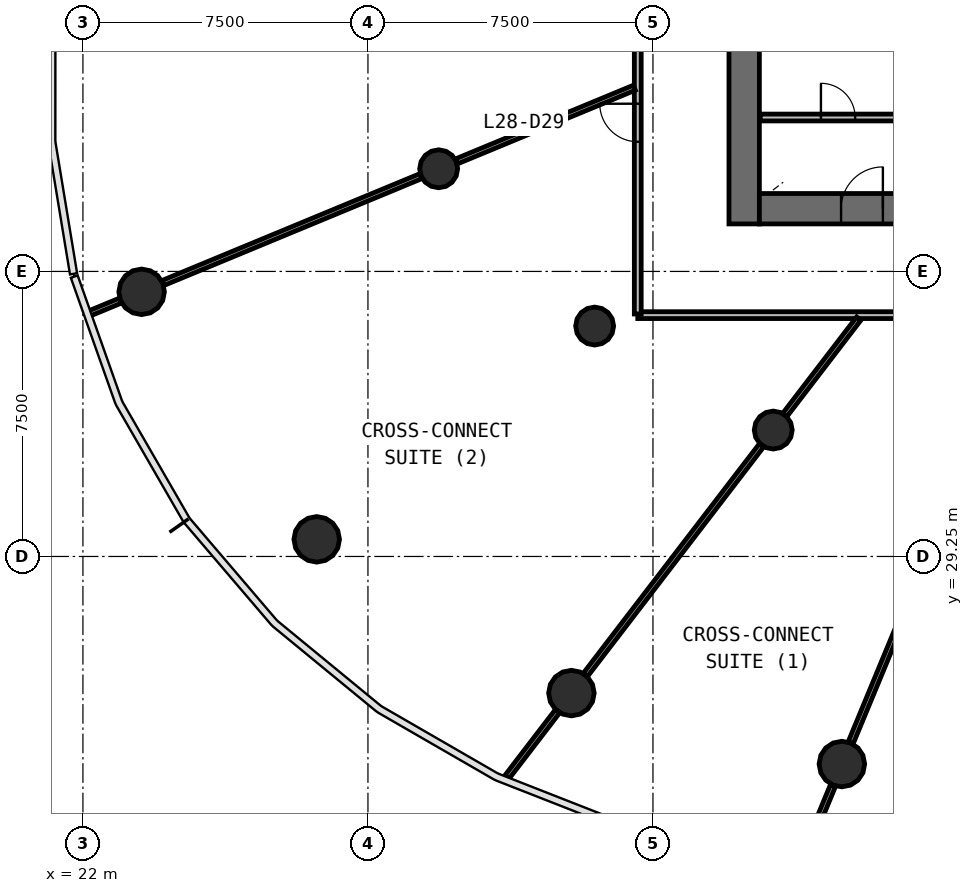
"""IFC4 building model, lengths in metres.
Left out: names, types, materials, properties, quantities, classifications, styles, units other than length and angle.
Written with IfcOpenShell. Run it as: python <this file> out.ifc"""

import sys

from ifc_helpers import new_model, si_unit, direction, frame, frame_2d, origin, origin_2d, place, context, subcontext, project, spatial, rectangle, circle, extrude, source, transform, mapped, element, fill, save


model = new_model("IFC4")
c1 = context("Model", 3, precision=1e-05, world=origin(), true_north=direction((0.0, 1.0)))
c2 = subcontext(c1, "Body", "Model", "MODEL_VIEW")
j1 = project(units=[si_unit("LENGTHUNIT", "METRE"), si_unit("PLANEANGLEUNIT", "RADIAN")], contexts=[c1])
p1 = place(None, origin())
s1 = spatial("IfcSite", under=j1, at=p1, CompositionType="ELEMENT")
p2 = place(p1, origin())
s2 = spatial("IfcBuilding", under=s1, at=p2, CompositionType="ELEMENT")
p3 = place(p2, frame((0.0, 0.0, 120.8)))
s3 = spatial("IfcBuildingStorey", under=s2, at=p3, CompositionType="ELEMENT", Elevation=120.8)
p4 = place(p3, frame((39.4, 58.0, 0.0), z_axis=(0.0, 0.0, 1.0), x_axis=(0.0, -1.0, 0.0)))
e1 = element("IfcWall", 1, at=p4, inside=s3, PredefinedType="SHEAR", context=c2, shape_type="SweptSolid", body=[
    extrude(rectangle(XDim=20.0, YDim=0.8, at=frame_2d((10.0, 0.0))), origin(), (0.0, 0.0, 1.0), 4.1),
])
p5 = place(p4, frame((9.1, 0.0, 0.0)))
e2 = element("IfcOpeningElement", 2, at=p5, cuts=e1, PredefinedType="OPENING", context=c2, shape_type="SweptSolid", body=[
    extrude(rectangle(XDim=1.8, YDim=2.1, at=frame_2d((0.9, 1.05))), frame((0.0, 0.41, 0.0), z_axis=(0.0, -1.0, 0.0), x_axis=(1.0, 0.0, 0.0)), (0.0, 0.0, 1.0), 0.82),
])
p6 = place(p3, frame((39.8, 38.4, 0.0), z_axis=(0.0, 0.0, 1.0), x_axis=(1.0, 0.0, 0.0)))
e3 = element("IfcWall", 3, at=p6, inside=s3, PredefinedType="SHEAR", context=c2, shape_type="SweptSolid", body=[
    extrude(rectangle(XDim=24.4, YDim=0.8, at=frame_2d((12.2, 0.0))), origin(), (0.0, 0.0, 1.0), 4.1),
])
p7 = place(p6, frame((21.65, 0.0, 0.0)))
e4 = element("IfcOpeningElement", 4, at=p7, cuts=e3, PredefinedType="OPENING", context=c2, shape_type="SweptSolid", body=[
    extrude(rectangle(XDim=1.1, YDim=2.1, at=frame_2d((0.55, 1.05))), frame((0.0, 0.41, 0.0), z_axis=(0.0, -1.0, 0.0), x_axis=(1.0, 0.0, 0.0)), (0.0, 0.0, 1.0), 0.82),
])
p8 = place(p6, frame((2.15, 0.0, 0.0)))
e5 = element("IfcOpeningElement", 5, at=p8, cuts=e3, PredefinedType="OPENING", context=c2, shape_type="SweptSolid", body=[
    extrude(rectangle(XDim=1.1, YDim=2.1, at=frame_2d((0.55, 1.05))), frame((0.0, 0.41, 0.0), z_axis=(0.0, -1.0, 0.0), x_axis=(1.0, 0.0, 0.0)), (0.0, 0.0, 1.0), 0.82),
])
m1 = source(origin(), c2, "Body", "SweptSolid", [
    extrude(circle(Radius=0.6, at=origin_2d()), origin(), (0.0, 0.0, 1.0), 4.1),
])
for number, where, z_axis, x_axis in (
    (6, (23.544, 36.213, 0.0), (0.0, 0.0, 1.0), (1.0, 0.0, 0.0)),
    (7, (28.152, 29.701, 0.0), (0.0, 0.0, 1.0), (1.0, 0.0, 0.0)),
    (8, (34.854, 25.655, 0.0), (0.0, 0.0, 1.0), (1.0, 0.0, 0.0)),
    (9, (41.971, 23.788, 0.0), (0.0, 0.0, 1.0), (1.0, 0.0, 0.0)),
):
    element("IfcColumn", number, at=place(p3, frame(where, z_axis=z_axis, x_axis=x_axis)), inside=s3, PredefinedType="COLUMN", context=c2, shape_type="MappedRepresentation", body=[
        mapped(m1, transform((0.0, 0.0, 0.0), scale=1.0)),
    ])
m2 = source(origin(), c2, "Body", "SweptSolid", [
    extrude(circle(Radius=0.5, at=origin_2d()), origin(), (0.0, 0.0, 1.0), 4.1),
])
for number, where, z_axis, x_axis in (
    (10, (31.361, 39.451, 0.0), (0.0, 0.0, 1.0), (1.0, 0.0, 0.0)),
    (11, (35.465, 35.312, 0.0), (0.0, 0.0, 1.0), (1.0, 0.0, 0.0)),
    (12, (40.165, 32.576, 0.0), (0.0, 0.0, 1.0), (1.0, 0.0, 0.0)),
):
    element("IfcColumn", number, at=place(p3, frame(where, z_axis=z_axis, x_axis=x_axis)), inside=s3, PredefinedType="COLUMN", context=c2, shape_type="MappedRepresentation", body=[
        mapped(m2, transform((0.0, 0.0, 0.0), scale=1.0)),
    ])
p9 = place(p3, frame((67.4, 35.6, 0.0), z_axis=(0.0, 0.0, 1.0), x_axis=(-1.0, 0.0, 0.0)))
e13 = element("IfcWall", 13, at=p9, inside=s3, PredefinedType="PARTITIONING", context=c2, shape_type="SweptSolid", body=[
    extrude(rectangle(XDim=30.8, YDim=0.18, at=frame_2d((15.4, 0.0))), origin(), (0.0, 0.0, 1.0), 2.9),
])
p10 = place(p9, frame((20.95, 0.0, 0.0)))
e14 = element("IfcOpeningElement", 14, at=p10, cuts=e13, PredefinedType="OPENING", context=c2, shape_type="SweptSolid", body=[
    extrude(rectangle(XDim=1.0, YDim=2.1, at=frame_2d((0.5, 1.05))), frame((0.0, 0.1, 0.0), z_axis=(0.0, -1.0, 0.0), x_axis=(1.0, 0.0, 0.0)), (0.0, 0.0, 1.0), 0.2),
])
p11 = place(p9, frame((14.95, 0.0, 0.0)))
e15 = element("IfcOpeningElement", 15, at=p11, cuts=e13, PredefinedType="OPENING", context=c2, shape_type="SweptSolid", body=[
    extrude(rectangle(XDim=1.0, YDim=2.1, at=frame_2d((0.5, 1.05))), frame((0.0, 0.1, 0.0), z_axis=(0.0, -1.0, 0.0), x_axis=(1.0, 0.0, 0.0)), (0.0, 0.0, 1.0), 0.2),
])
p12 = place(p9, frame((12.55, 0.0, 0.0)))
e16 = element("IfcOpeningElement", 16, at=p12, cuts=e13, PredefinedType="OPENING", context=c2, shape_type="SweptSolid", body=[
    extrude(rectangle(XDim=1.0, YDim=2.1, at=frame_2d((0.5, 1.05))), frame((0.0, 0.1, 0.0), z_axis=(0.0, -1.0, 0.0), x_axis=(1.0, 0.0, 0.0)), (0.0, 0.0, 1.0), 0.2),
])
p13 = place(p3, frame((36.6, 35.63, 0.0), z_axis=(0.0, 0.0, 1.0), x_axis=(0.0, 1.0, 0.0)))
e17 = element("IfcWall", 17, at=p13, inside=s3, PredefinedType="PARTITIONING", context=c2, shape_type="SweptSolid", body=[
    extrude(rectangle(XDim=23.583, YDim=0.18, at=frame_2d((11.791, 0.0))), origin(), (0.0, 0.0, 1.0), 2.9),
])
p14 = place(p13, frame((11.333, 0.0, 0.0)))
e18 = element("IfcOpeningElement", 18, at=p14, cuts=e17, PredefinedType="OPENING", context=c2, shape_type="SweptSolid", body=[
    extrude(rectangle(XDim=1.0, YDim=2.1, at=frame_2d((0.5, 1.05))), frame((0.0, 0.1, 0.0), z_axis=(0.0, -1.0, 0.0), x_axis=(1.0, 0.0, 0.0)), (0.0, 0.0, 1.0), 0.2),
])
p15 = place(p13, frame((4.532, 0.0, 0.0)))
e19 = element("IfcOpeningElement", 19, at=p15, cuts=e17, PredefinedType="OPENING", context=c2, shape_type="SweptSolid", body=[
    extrude(rectangle(XDim=1.0, YDim=2.1, at=frame_2d((0.5, 1.05))), frame((0.0, 0.1, 0.0), z_axis=(0.0, -1.0, 0.0), x_axis=(1.0, 0.0, 0.0)), (0.0, 0.0, 1.0), 0.2),
])
p16 = place(p3, frame((39.82, 40.8, 0.0), z_axis=(0.0, 0.0, 1.0), x_axis=(1.0, 0.0, 0.0)))
e20 = element("IfcWall", 20, at=p16, inside=s3, PredefinedType="PARTITIONING", context=c2, shape_type="SweptSolid", body=[
    extrude(rectangle(XDim=3.95, YDim=0.18, at=frame_2d((1.975, 0.0))), origin(), (0.0, 0.0, 1.0), 3.7),
])
p17 = place(p16, frame((1.6, 0.0, 0.0)))
e21 = element("IfcOpeningElement", 21, at=p17, cuts=e20, PredefinedType="OPENING", context=c2, shape_type="SweptSolid", body=[
    extrude(rectangle(XDim=0.9, YDim=2.1, at=frame_2d((0.45, 1.05))), frame((0.0, 0.1, 0.0), z_axis=(0.0, -1.0, 0.0), x_axis=(1.0, 0.0, 0.0)), (0.0, 0.0, 1.0), 0.2),
])
p18 = place(p3, frame((39.858, 32.176, 0.0), z_axis=(0.0, 0.0, 1.0), x_axis=(-0.608755907151, -0.793357577331, 0.0)))
e22 = element("IfcWall", 22, at=p18, inside=s3, PredefinedType="PARTITIONING", context=c2, shape_type="SweptSolid", body=[
    extrude(rectangle(XDim=7.615, YDim=0.14, at=frame_2d((3.808, 0.0))), origin(), (0.0, 0.0, 1.0), 2.9),
])
p19 = place(p3, frame((30.894, 39.258, 0.0), z_axis=(0.0, 0.0, 1.0), x_axis=(-0.923867037115, -0.382713597528, 0.0)))
e23 = element("IfcWall", 23, at=p19, inside=s3, PredefinedType="PARTITIONING", context=c2, shape_type="SweptSolid", body=[
    extrude(rectangle(XDim=7.35, YDim=0.14, at=frame_2d((3.675, 0.0))), origin(), (0.0, 0.0, 1.0), 2.9),
])
p20 = place(p3, frame((44.752, 30.502, 0.0), z_axis=(0.0, 0.0, 1.0), x_axis=(-0.382696989205, -0.923873916968, 0.0)))
e24 = element("IfcWall", 24, at=p20, inside=s3, PredefinedType="PARTITIONING", context=c2, shape_type="SweptSolid", body=[
    extrude(rectangle(XDim=6.663, YDim=0.14, at=frame_2d((3.332, 0.0))), origin(), (0.0, 0.0, 1.0), 2.9),
])
p21 = place(p3, frame((36.51, 41.584, 0.0), z_axis=(0.0, 0.0, 1.0), x_axis=(-0.923890025086, -0.382658100067, 0.0)))
e25 = element("IfcWall", 25, at=p21, inside=s3, PredefinedType="PARTITIONING", context=c2, shape_type="SweptSolid", body=[
    extrude(rectangle(XDim=5.068, YDim=0.14, at=frame_2d((2.534, 0.0))), origin(), (0.0, 0.0, 1.0), 2.9),
])
p22 = place(p3, frame((42.416, 35.51, 0.0), z_axis=(0.0, 0.0, 1.0), x_axis=(-0.60874605662, -0.793365135703, 0.0)))
e26 = element("IfcWall", 26, at=p22, inside=s3, PredefinedType="PARTITIONING", context=c2, shape_type="SweptSolid", body=[
    extrude(rectangle(XDim=3.194, YDim=0.14, at=frame_2d((1.597, 0.0))), origin(), (0.0, 0.0, 1.0), 2.9),
])
p23 = place(p3, frame((34.486, 25.176, 0.0), z_axis=(0.0, 0.0, 1.0), x_axis=(-0.608790940556, -0.793330694412, 0.0)))
e27 = element("IfcWall", 27, at=p23, inside=s3, PredefinedType="PARTITIONING", context=c2, shape_type="SweptSolid", body=[
    extrude(rectangle(XDim=2.182, YDim=0.14, at=frame_2d((1.091, 0.0))), origin(), (0.0, 0.0, 1.0), 2.9),
])
p24 = place(p3, frame((41.74, 23.229, 0.0), z_axis=(0.0, 0.0, 1.0), x_axis=(-0.38271416586, -0.923866801682, 0.0)))
e28 = element("IfcWall", 28, at=p24, inside=s3, PredefinedType="PARTITIONING", context=c2, shape_type="SweptSolid", body=[
    extrude(rectangle(XDim=2.162, YDim=0.14, at=frame_2d((1.081, 0.0))), origin(), (0.0, 0.0, 1.0), 2.9),
])
p25 = place(p3, frame((22.986, 35.982, 0.0), z_axis=(0.0, 0.0, 1.0), x_axis=(-0.923950055321, -0.38251313085, 0.0)))
e29 = element("IfcWall", 29, at=p25, inside=s3, PredefinedType="PARTITIONING", context=c2, shape_type="SweptSolid", body=[
    extrude(rectangle(XDim=0.891, YDim=0.14, at=frame_2d((0.446, 0.0))), origin(), (0.0, 0.0, 1.0), 2.9),
])
m3 = source(origin(), c2, "Body", "SweptSolid", [
    extrude(rectangle(XDim=1.1, YDim=2.1, at=frame_2d((0.55, 1.05))), frame((0.0, 0.025, 0.0), z_axis=(0.0, -1.0, 0.0), x_axis=(1.0, 0.0, 0.0)), (0.0, 0.0, 1.0), 0.05),
])
p26 = place(p8, origin())
e30 = element("IfcDoor", 30, at=p26, inside=s3, OperationType="SINGLE_SWING_RIGHT", PredefinedType="DOOR", context=c2, shape_type="MappedRepresentation", body=[
    mapped(m3, transform((0.0, 0.0, 0.0), scale=1.0)),
])
fill(e5, e30)
m4 = source(origin(), c2, "Body", "SweptSolid", [
    extrude(rectangle(XDim=1.0, YDim=2.1, at=frame_2d((0.5, 1.05))), frame((0.0, 0.025, 0.0), z_axis=(0.0, -1.0, 0.0), x_axis=(1.0, 0.0, 0.0)), (0.0, 0.0, 1.0), 0.05),
])
p27 = place(p15, origin())
e31 = element("IfcDoor", 31, at=p27, inside=s3, OperationType="SINGLE_SWING_RIGHT", PredefinedType="DOOR", context=c2, shape_type="MappedRepresentation", body=[
    mapped(m4, transform((0.0, 0.0, 0.0), scale=1.0)),
])
fill(e19, e31)
m5 = source(origin(), c2, "Body", "SweptSolid", [
    extrude(rectangle(XDim=0.9, YDim=2.1, at=frame_2d((0.45, 1.05))), frame((0.0, 0.025, 0.0), z_axis=(0.0, -1.0, 0.0), x_axis=(1.0, 0.0, 0.0)), (0.0, 0.0, 1.0), 0.05),
])
p28 = place(p17, origin())
e32 = element("IfcDoor", 32, at=p28, inside=s3, OperationType="SINGLE_SWING_LEFT", PredefinedType="DOOR", context=c2, shape_type="MappedRepresentation", body=[
    mapped(m5, transform((0.0, 0.0, 0.0), scale=1.0)),
])
fill(e21, e32)
save(model, sys.argv[1])
